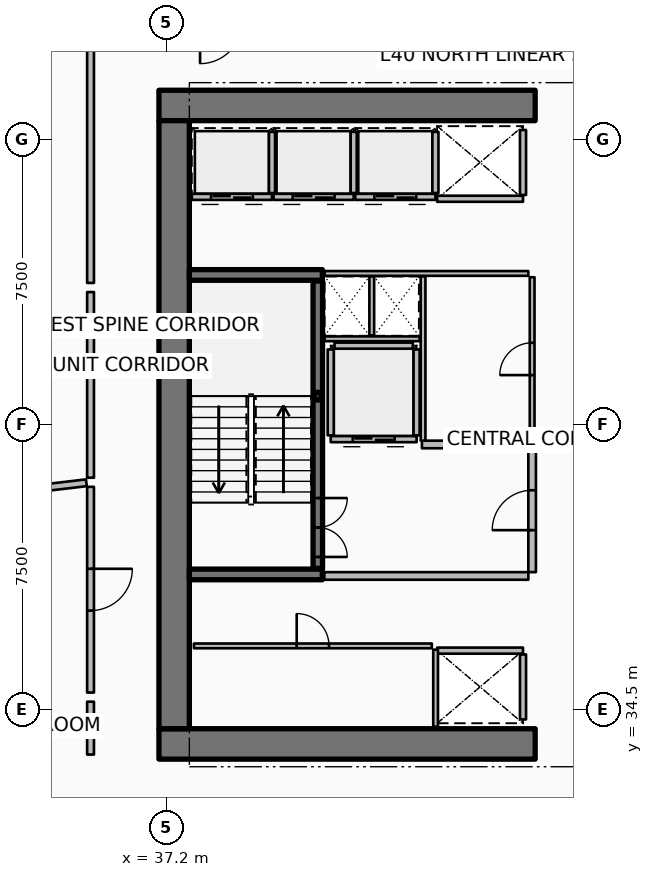
"""IFC4 building model, lengths in metres.
Left out: names, types, materials, properties, quantities, classifications, styles, units other than length and angle.
Written with IfcOpenShell. Run it as: python <this file> out.ifc"""

import sys

from ifc_helpers import new_model, si_unit, direction, frame, frame_2d, origin, origin_2d, place, context, subcontext, project, spatial, rectangle, hollow_rectangle, extrude, element, fill, save


model = new_model("IFC4")
c1 = context("Model", 3, precision=1e-05, world=origin(), true_north=direction((0.0, 1.0)))
c2 = subcontext(c1, "Body", "Model", "MODEL_VIEW")
j1 = project(units=[si_unit("LENGTHUNIT", "METRE"), si_unit("PLANEANGLEUNIT", "RADIAN")], contexts=[c1])
p1 = place(None, origin())
s1 = spatial("IfcSite", under=j1, at=p1, CompositionType="ELEMENT")
p2 = place(p1, origin())
s2 = spatial("IfcBuilding", under=s1, at=p2, CompositionType="ELEMENT")
p3 = place(p2, frame((0.0, 0.0, 161.55)))
s3 = spatial("IfcBuildingStorey", under=s2, at=p3, CompositionType="ELEMENT", Elevation=161.55)
for number, where, z_axis, x_axis in (
    (1, (37.0, 33.6, 0.0), (0.0, 0.0, 1.0), (1.0, 0.0, 0.0)),
    (2, (37.0, 50.4, 0.0), (0.0, 0.0, 1.0), (1.0, 0.0, 0.0)),
):
    element("IfcWall", number, at=place(p3, frame(where, z_axis=z_axis, x_axis=x_axis)), inside=s3, PredefinedType="SHEAR", context=c2, shape_type="SweptSolid", body=[
        extrude(rectangle(XDim=9.9, YDim=0.8, at=frame_2d((4.95, 0.0))), origin(), (0.0, 0.0, 1.0), 3.75),
    ])
p4 = place(p3, frame((37.4, 34.0, 0.0), z_axis=(0.0, 0.0, 1.0), x_axis=(0.0, 1.0, 0.0)))
e3 = element("IfcWall", 3, at=p4, inside=s3, PredefinedType="SHEAR", context=c2, shape_type="SweptSolid", body=[
    extrude(rectangle(XDim=16.0, YDim=0.8, at=frame_2d((8.0, 0.0))), origin(), (0.0, 0.0, 1.0), 3.75),
])
for number, where, z_axis, x_axis in (
    (4, (37.8, 38.06, 0.0), (0.0, 0.0, 1.0), (1.0, 0.0, 0.0)),
    (5, (37.8, 45.94, 0.0), (0.0, 0.0, 1.0), (1.0, 0.0, 0.0)),
):
    element("IfcWall", number, at=place(p3, frame(where, z_axis=z_axis, x_axis=x_axis)), inside=s3, PredefinedType="SHEAR", context=c2, shape_type="SweptSolid", body=[
        extrude(rectangle(XDim=3.5, YDim=0.28, at=frame_2d((1.75, 0.0))), origin(), (0.0, 0.0, 1.0), 3.75),
    ])
p5 = place(p3, frame((41.18, 42.75, 0.0), z_axis=(0.0, 0.0, 1.0), x_axis=(1.0, 0.0, 0.0)))
e6 = element("IfcColumn", 6, at=p5, inside=s3, PredefinedType="COLUMN", context=c2, shape_type="SweptSolid", body=[
    extrude(hollow_rectangle(XDim=0.2, YDim=0.2, WallThickness=0.01, InnerFilletRadius=0.01, OuterFilletRadius=0.02, at=origin_2d()), origin(), (0.0, 0.0, 1.0), 1.67),
])
p6 = place(p3, frame((41.18, 38.22, 0.0), z_axis=(0.0, 0.0, 1.0), x_axis=(0.0, 1.0, 0.0)))
e7 = element("IfcWall", 7, at=p6, inside=s3, PredefinedType="SOLIDWALL", context=c2, shape_type="SweptSolid", body=[
    extrude(rectangle(XDim=7.56, YDim=0.25, at=frame_2d((3.78, 0.0))), origin(), (0.0, 0.0, 1.0), 3.5),
])
p7 = place(p6, frame((0.3, 0.0, 0.0)))
e8 = element("IfcOpeningElement", 8, at=p7, cuts=e7, PredefinedType="OPENING", context=c2, shape_type="SweptSolid", body=[
    extrude(rectangle(XDim=1.55, YDim=2.15, at=frame_2d((0.775, 1.075))), frame((0.0, 0.135, 0.0), z_axis=(0.0, -1.0, 0.0), x_axis=(1.0, 0.0, 0.0)), (0.0, 0.0, 1.0), 0.27),
])
p8 = place(p3, frame((39.975, 47.995, 0.0), z_axis=(0.0, 0.0, 1.0), x_axis=(-1.0, 0.0, 0.0)))
e9 = element("IfcWall", 9, at=p8, inside=s3, PredefinedType="PARTITIONING", context=c2, shape_type="SweptSolid", body=[
    extrude(rectangle(XDim=2.11, YDim=0.16, at=frame_2d((1.055, 0.0))), origin(), (0.0, 0.0, 1.0), 3.5),
])
p9 = place(p8, frame((0.505, 0.0, 0.0)))
e10 = element("IfcOpeningElement", 10, at=p9, cuts=e9, PredefinedType="OPENING", context=c2, shape_type="SweptSolid", body=[
    extrude(rectangle(XDim=1.1, YDim=2.1, at=frame_2d((0.55, 1.05))), frame((0.0, 0.09, 0.0), z_axis=(0.0, -1.0, 0.0), x_axis=(1.0, 0.0, 0.0)), (0.0, 0.0, 1.0), 0.18),
])
p10 = place(p3, frame((39.975, 48.095, 0.0), z_axis=(0.0, 0.0, 1.0), x_axis=(0.0, 1.0, 0.0)))
e11 = element("IfcWall", 11, at=p10, inside=s3, PredefinedType="PARTITIONING", context=c2, shape_type="SweptSolid", body=[
    extrude(rectangle(XDim=1.61, YDim=0.16, at=frame_2d((0.805, 0.0))), origin(), (0.0, 0.0, 1.0), 3.5),
])
p11 = place(p3, frame((42.125, 47.995, 0.0), z_axis=(0.0, 0.0, 1.0), x_axis=(-1.0, 0.0, 0.0)))
e12 = element("IfcWall", 12, at=p11, inside=s3, PredefinedType="PARTITIONING", context=c2, shape_type="SweptSolid", body=[
    extrude(rectangle(XDim=2.11, YDim=0.16, at=frame_2d((1.055, 0.0))), origin(), (0.0, 0.0, 1.0), 3.5),
])
p12 = place(p11, frame((0.505, 0.0, 0.0)))
e13 = element("IfcOpeningElement", 13, at=p12, cuts=e12, PredefinedType="OPENING", context=c2, shape_type="SweptSolid", body=[
    extrude(rectangle(XDim=1.1, YDim=2.1, at=frame_2d((0.55, 1.05))), frame((0.0, 0.09, 0.0), z_axis=(0.0, -1.0, 0.0), x_axis=(1.0, 0.0, 0.0)), (0.0, 0.0, 1.0), 0.18),
])
p13 = place(p3, frame((42.125, 48.095, 0.0), z_axis=(0.0, 0.0, 1.0), x_axis=(0.0, 1.0, 0.0)))
e14 = element("IfcWall", 14, at=p13, inside=s3, PredefinedType="PARTITIONING", context=c2, shape_type="SweptSolid", body=[
    extrude(rectangle(XDim=1.61, YDim=0.16, at=frame_2d((0.805, 0.0))), origin(), (0.0, 0.0, 1.0), 3.5),
])
p14 = place(p3, frame((44.275, 47.995, 0.0), z_axis=(0.0, 0.0, 1.0), x_axis=(-1.0, 0.0, 0.0)))
e15 = element("IfcWall", 15, at=p14, inside=s3, PredefinedType="PARTITIONING", context=c2, shape_type="SweptSolid", body=[
    extrude(rectangle(XDim=2.11, YDim=0.16, at=frame_2d((1.055, 0.0))), origin(), (0.0, 0.0, 1.0), 3.5),
])
p15 = place(p14, frame((0.505, 0.0, 0.0)))
e16 = element("IfcOpeningElement", 16, at=p15, cuts=e15, PredefinedType="OPENING", context=c2, shape_type="SweptSolid", body=[
    extrude(rectangle(XDim=1.1, YDim=2.1, at=frame_2d((0.55, 1.05))), frame((0.0, 0.09, 0.0), z_axis=(0.0, -1.0, 0.0), x_axis=(1.0, 0.0, 0.0)), (0.0, 0.0, 1.0), 0.18),
])
p16 = place(p3, frame((44.275, 48.095, 0.0), z_axis=(0.0, 0.0, 1.0), x_axis=(0.0, 1.0, 0.0)))
e17 = element("IfcWall", 17, at=p16, inside=s3, PredefinedType="PARTITIONING", context=c2, shape_type="SweptSolid", body=[
    extrude(rectangle(XDim=1.61, YDim=0.16, at=frame_2d((0.805, 0.0))), origin(), (0.0, 0.0, 1.0), 3.5),
])
p17 = place(p3, frame((46.58, 47.945, 0.0), z_axis=(0.0, 0.0, 1.0), x_axis=(-1.0, 0.0, 0.0)))
e18 = element("IfcWall", 18, at=p17, inside=s3, PredefinedType="PARTITIONING", context=c2, shape_type="SweptSolid", body=[
    extrude(rectangle(XDim=2.26, YDim=0.16, at=frame_2d((1.13, 0.0))), origin(), (0.0, 0.0, 1.0), 3.5),
])
p18 = place(p3, frame((46.58, 48.045, 0.0), z_axis=(0.0, 0.0, 1.0), x_axis=(0.0, 1.0, 0.0)))
e19 = element("IfcWall", 19, at=p18, inside=s3, PredefinedType="PARTITIONING", context=c2, shape_type="SweptSolid", body=[
    extrude(rectangle(XDim=1.71, YDim=0.16, at=frame_2d((0.855, 0.0))), origin(), (0.0, 0.0, 1.0), 3.5),
])
p19 = place(p3, frame((44.32, 36.055, 0.0), z_axis=(0.0, 0.0, 1.0), x_axis=(1.0, 0.0, 0.0)))
e20 = element("IfcWall", 20, at=p19, inside=s3, PredefinedType="PARTITIONING", context=c2, shape_type="SweptSolid", body=[
    extrude(rectangle(XDim=2.26, YDim=0.16, at=frame_2d((1.13, 0.0))), origin(), (0.0, 0.0, 1.0), 3.5),
])
p20 = place(p3, frame((46.58, 34.245, 0.0), z_axis=(0.0, 0.0, 1.0), x_axis=(0.0, 1.0, 0.0)))
e21 = element("IfcWall", 21, at=p20, inside=s3, PredefinedType="PARTITIONING", context=c2, shape_type="SweptSolid", body=[
    extrude(rectangle(XDim=1.71, YDim=0.16, at=frame_2d((0.855, 0.0))), origin(), (0.0, 0.0, 1.0), 3.5),
])
p21 = place(p3, frame((43.78, 41.62, 0.0), z_axis=(0.0, 0.0, 1.0), x_axis=(-1.0, 0.0, 0.0)))
e22 = element("IfcWall", 22, at=p21, inside=s3, PredefinedType="PARTITIONING", context=c2, shape_type="SweptSolid", body=[
    extrude(rectangle(XDim=2.26, YDim=0.16, at=frame_2d((1.13, 0.0))), origin(), (0.0, 0.0, 1.0), 3.5),
])
p22 = place(p21, frame((0.58, 0.0, 0.0)))
e23 = element("IfcOpeningElement", 23, at=p22, cuts=e22, PredefinedType="OPENING", context=c2, shape_type="SweptSolid", body=[
    extrude(rectangle(XDim=1.1, YDim=2.1, at=frame_2d((0.55, 1.05))), frame((0.0, 0.09, 0.0), z_axis=(0.0, -1.0, 0.0), x_axis=(1.0, 0.0, 0.0)), (0.0, 0.0, 1.0), 0.18),
])
for number, where, z_axis, x_axis in (
    (24, (43.78, 41.72, 0.0), (0.0, 0.0, 1.0), (0.0, 1.0, 0.0)),
    (25, (41.52, 41.72, 0.0), (0.0, 0.0, 1.0), (0.0, 1.0, 0.0)),
):
    element("IfcWall", number, at=place(p3, frame(where, z_axis=z_axis, x_axis=x_axis)), inside=s3, PredefinedType="PARTITIONING", context=c2, shape_type="SweptSolid", body=[
        extrude(rectangle(XDim=2.26, YDim=0.16, at=frame_2d((1.13, 0.0))), origin(), (0.0, 0.0, 1.0), 3.5),
    ])
p23 = place(p3, frame((41.62, 44.08, 0.0), z_axis=(0.0, 0.0, 1.0), x_axis=(1.0, 0.0, 0.0)))
e26 = element("IfcWall", 26, at=p23, inside=s3, PredefinedType="PARTITIONING", context=c2, shape_type="SweptSolid", body=[
    extrude(rectangle(XDim=2.06, YDim=0.16, at=frame_2d((1.03, 0.0))), origin(), (0.0, 0.0, 1.0), 3.5),
])
p24 = place(p3, frame((44.28, 34.05, 0.0), z_axis=(0.0, 0.0, 1.0), x_axis=(0.0, 1.0, 0.0)))
e27 = element("IfcWall", 27, at=p24, inside=s3, PredefinedType="PARTITIONING", context=c2, shape_type="SweptSolid", body=[
    extrude(rectangle(XDim=2.03, YDim=0.125, at=frame_2d((1.015, 0.0))), origin(), (0.0, 0.0, 1.0), 2.94),
])
p25 = place(p3, frame((37.92, 36.18, 0.0), z_axis=(0.0, 0.0, 1.0), x_axis=(1.0, 0.0, 0.0)))
e28 = element("IfcWall", 28, at=p25, inside=s3, PredefinedType="PARTITIONING", context=c2, shape_type="SweptSolid", body=[
    extrude(rectangle(XDim=6.26, YDim=0.125, at=frame_2d((3.13, 0.0))), origin(), (0.0, 0.0, 1.0), 2.94),
])
p26 = place(p25, frame((2.705, 0.0, 0.0)))
e29 = element("IfcOpeningElement", 29, at=p26, cuts=e28, PredefinedType="OPENING", context=c2, shape_type="SweptSolid", body=[
    extrude(rectangle(XDim=0.85, YDim=2.06, at=frame_2d((0.425, 1.03))), frame((0.0, 0.073, 0.0), z_axis=(0.0, -1.0, 0.0), x_axis=(1.0, 0.0, 0.0)), (0.0, 0.0, 1.0), 0.145),
])
p27 = place(p3, frame((41.35, 38.02, 0.0), z_axis=(0.0, 0.0, 1.0), x_axis=(1.0, 0.0, 0.0)))
e30 = element("IfcWall", 30, at=p27, inside=s3, PredefinedType="PARTITIONING", context=c2, shape_type="SweptSolid", body=[
    extrude(rectangle(XDim=5.37, YDim=0.2, at=frame_2d((2.685, 0.0))), origin(), (0.0, 0.0, 1.0), 3.5),
])
p28 = place(p3, frame((43.92, 41.48, 0.0), z_axis=(0.0, 0.0, 1.0), x_axis=(1.0, 0.0, 0.0)))
e31 = element("IfcWall", 31, at=p28, inside=s3, PredefinedType="PARTITIONING", context=c2, shape_type="SweptSolid", body=[
    extrude(rectangle(XDim=2.8, YDim=0.2, at=frame_2d((1.4, 0.0))), origin(), (0.0, 0.0, 1.0), 3.5),
])
p29 = place(p3, frame((46.82, 38.12, 0.0), z_axis=(0.0, 0.0, 1.0), x_axis=(0.0, 1.0, 0.0)))
e32 = element("IfcWall", 32, at=p29, inside=s3, PredefinedType="PARTITIONING", context=c2, shape_type="SweptSolid", body=[
    extrude(rectangle(XDim=3.26, YDim=0.2, at=frame_2d((1.63, 0.0))), origin(), (0.0, 0.0, 1.0), 3.5),
])
p30 = place(p29, frame((1.105, 0.0, 0.0)))
e33 = element("IfcOpeningElement", 33, at=p30, cuts=e32, PredefinedType="OPENING", context=c2, shape_type="SweptSolid", body=[
    extrude(rectangle(XDim=1.05, YDim=2.1, at=frame_2d((0.525, 1.05))), frame((0.0, 0.11, 0.0), z_axis=(0.0, -1.0, 0.0), x_axis=(1.0, 0.0, 0.0)), (0.0, 0.0, 1.0), 0.22),
])
p31 = place(p3, frame((41.36, 45.98, 0.0), z_axis=(0.0, 0.0, 1.0), x_axis=(1.0, 0.0, 0.0)))
e34 = element("IfcWall", 34, at=p31, inside=s3, PredefinedType="PARTITIONING", context=c2, shape_type="SweptSolid", body=[
    extrude(rectangle(XDim=5.36, YDim=0.125, at=frame_2d((2.68, 0.0))), origin(), (0.0, 0.0, 1.0), 2.94),
])
p32 = place(p3, frame((41.36, 44.26, 0.0), z_axis=(0.0, 0.0, 1.0), x_axis=(1.0, 0.0, 0.0)))
e35 = element("IfcWall", 35, at=p32, inside=s3, PredefinedType="PARTITIONING", context=c2, shape_type="SweptSolid", body=[
    extrude(rectangle(XDim=2.5, YDim=0.125, at=frame_2d((1.25, 0.0))), origin(), (0.0, 0.0, 1.0), 2.94),
])
p33 = place(p3, frame((42.6, 44.35, 0.0), z_axis=(0.0, 0.0, 1.0), x_axis=(0.0, 1.0, 0.0)))
e36 = element("IfcWall", 36, at=p33, inside=s3, PredefinedType="PARTITIONING", context=c2, shape_type="SweptSolid", body=[
    extrude(rectangle(XDim=1.55, YDim=0.125, at=frame_2d((0.775, 0.0))), origin(), (0.0, 0.0, 1.0), 2.94),
])
p34 = place(p3, frame((43.95, 41.58, 0.0), z_axis=(0.0, 0.0, 1.0), x_axis=(0.0, 1.0, 0.0)))
e37 = element("IfcWall", 37, at=p34, inside=s3, PredefinedType="PARTITIONING", context=c2, shape_type="SweptSolid", body=[
    extrude(rectangle(XDim=4.32, YDim=0.125, at=frame_2d((2.16, 0.0))), origin(), (0.0, 0.0, 1.0), 2.94),
])
p35 = place(p3, frame((46.82, 41.58, 0.0), z_axis=(0.0, 0.0, 1.0), x_axis=(0.0, 1.0, 0.0)))
e38 = element("IfcWall", 38, at=p35, inside=s3, PredefinedType="PARTITIONING", context=c2, shape_type="SweptSolid", body=[
    extrude(rectangle(XDim=4.3, YDim=0.125, at=frame_2d((2.15, 0.0))), origin(), (0.0, 0.0, 1.0), 2.94),
])
p36 = place(p35, frame((1.725, 0.0, 0.0)))
e39 = element("IfcOpeningElement", 39, at=p36, cuts=e38, PredefinedType="OPENING", context=c2, shape_type="SweptSolid", body=[
    extrude(rectangle(XDim=0.85, YDim=2.06, at=frame_2d((0.425, 1.03))), frame((0.0, 0.073, 0.0), z_axis=(0.0, -1.0, 0.0), x_axis=(1.0, 0.0, 0.0)), (0.0, 0.0, 1.0), 0.145),
])
p37 = place(p3, frame((35.091, 40.472, 0.0), z_axis=(0.0, 0.0, 1.0), x_axis=(-0.993067434621, -0.11754603479, 0.0)))
e40 = element("IfcWall", 40, at=p37, inside=s3, PredefinedType="PARTITIONING", context=c2, shape_type="SweptSolid", body=[
    extrude(rectangle(XDim=13.787, YDim=0.18, at=frame_2d((6.894, 0.0))), origin(), (0.0, 0.0, 1.0), 2.94),
])
p38 = place(p3, frame((35.2, 51.971, 0.0), z_axis=(0.0, 0.0, 1.0), x_axis=(0.0, -1.0, 0.0)))
e41 = element("IfcWall", 41, at=p38, inside=s3, PredefinedType="PARTITIONING", context=c2, shape_type="SweptSolid", body=[
    extrude(rectangle(XDim=6.241, YDim=0.18, at=frame_2d((3.12, 0.0))), origin(), (0.0, 0.0, 1.0), 2.94),
])
p39 = place(p3, frame((35.2, 45.49, 0.0), z_axis=(0.0, 0.0, 1.0), x_axis=(0.0, -1.0, 0.0)))
e42 = element("IfcWall", 42, at=p39, inside=s3, PredefinedType="PARTITIONING", context=c2, shape_type="SweptSolid", body=[
    extrude(rectangle(XDim=4.885, YDim=0.18, at=frame_2d((2.442, 0.0))), origin(), (0.0, 0.0, 1.0), 2.94),
])
p40 = place(p3, frame((35.2, 40.365, 0.0), z_axis=(0.0, 0.0, 1.0), x_axis=(0.0, -1.0, 0.0)))
e43 = element("IfcWall", 43, at=p40, inside=s3, PredefinedType="PARTITIONING", context=c2, shape_type="SweptSolid", body=[
    extrude(rectangle(XDim=5.413, YDim=0.18, at=frame_2d((2.707, 0.0))), origin(), (0.0, 0.0, 1.0), 2.94),
])
p41 = place(p40, frame((2.156, 0.0, 0.0)))
e44 = element("IfcOpeningElement", 44, at=p41, cuts=e43, PredefinedType="OPENING", context=c2, shape_type="SweptSolid", body=[
    extrude(rectangle(XDim=1.1, YDim=2.1, at=frame_2d((0.55, 1.05))), frame((0.0, 0.1, 0.0), z_axis=(0.0, -1.0, 0.0), x_axis=(1.0, 0.0, 0.0)), (0.0, 0.0, 1.0), 0.2),
])
p42 = place(p3, frame((35.2, 34.712, 0.0), z_axis=(0.0, 0.0, 1.0), x_axis=(0.0, -1.0, 0.0)))
e45 = element("IfcWall", 45, at=p42, inside=s3, PredefinedType="PARTITIONING", context=c2, shape_type="SweptSolid", body=[
    extrude(rectangle(XDim=1.392, YDim=0.18, at=frame_2d((0.696, 0.0))), origin(), (0.0, 0.0, 1.0), 2.94),
])
p43 = place(p7, origin())
e46 = element("IfcDoor", 46, at=p43, inside=s3, OperationType="DOUBLE_DOOR_SINGLE_SWING", PredefinedType="DOOR", context=c2, shape_type="SweptSolid", body=[
    extrude(rectangle(XDim=1.55, YDim=2.15, at=frame_2d((0.775, 1.075))), frame((0.0, 0.025, 0.0), z_axis=(0.0, -1.0, 0.0), x_axis=(1.0, 0.0, 0.0)), (0.0, 0.0, 1.0), 0.05),
])
fill(e8, e46)
p44 = place(p9, origin())
e47 = element("IfcDoor", 47, at=p44, inside=s3, OperationType="DOUBLE_DOOR_SLIDING", PredefinedType="DOOR", context=c2, shape_type="SweptSolid", body=[
    extrude(rectangle(XDim=1.1, YDim=2.1, at=frame_2d((0.55, 1.05))), frame((0.0, 0.025, 0.0), z_axis=(0.0, -1.0, 0.0), x_axis=(1.0, 0.0, 0.0)), (0.0, 0.0, 1.0), 0.05),
])
fill(e10, e47)
p45 = place(p12, origin())
e48 = element("IfcDoor", 48, at=p45, inside=s3, OperationType="DOUBLE_DOOR_SLIDING", PredefinedType="DOOR", context=c2, shape_type="SweptSolid", body=[
    extrude(rectangle(XDim=1.1, YDim=2.1, at=frame_2d((0.55, 1.05))), frame((0.0, 0.025, 0.0), z_axis=(0.0, -1.0, 0.0), x_axis=(1.0, 0.0, 0.0)), (0.0, 0.0, 1.0), 0.05),
])
fill(e13, e48)
p46 = place(p15, origin())
e49 = element("IfcDoor", 49, at=p46, inside=s3, OperationType="DOUBLE_DOOR_SLIDING", PredefinedType="DOOR", context=c2, shape_type="SweptSolid", body=[
    extrude(rectangle(XDim=1.1, YDim=2.1, at=frame_2d((0.55, 1.05))), frame((0.0, 0.025, 0.0), z_axis=(0.0, -1.0, 0.0), x_axis=(1.0, 0.0, 0.0)), (0.0, 0.0, 1.0), 0.05),
])
fill(e16, e49)
p47 = place(p22, origin())
e50 = element("IfcDoor", 50, at=p47, inside=s3, OperationType="DOUBLE_DOOR_SLIDING", PredefinedType="DOOR", context=c2, shape_type="SweptSolid", body=[
    extrude(rectangle(XDim=1.1, YDim=2.1, at=frame_2d((0.55, 1.05))), frame((0.0, 0.025, 0.0), z_axis=(0.0, -1.0, 0.0), x_axis=(1.0, 0.0, 0.0)), (0.0, 0.0, 1.0), 0.05),
])
fill(e23, e50)
p48 = place(p26, origin())
e51 = element("IfcDoor", 51, at=p48, inside=s3, OperationType="SINGLE_SWING_LEFT", PredefinedType="DOOR", context=c2, shape_type="SweptSolid", body=[
    extrude(rectangle(XDim=0.85, YDim=2.06, at=frame_2d((0.425, 1.03))), frame((0.0, 0.025, 0.0), z_axis=(0.0, -1.0, 0.0), x_axis=(1.0, 0.0, 0.0)), (0.0, 0.0, 1.0), 0.05),
])
fill(e29, e51)
p49 = place(p30, origin())
e52 = element("IfcDoor", 52, at=p49, inside=s3, OperationType="SINGLE_SWING_LEFT", PredefinedType="DOOR", context=c2, shape_type="SweptSolid", body=[
    extrude(rectangle(XDim=1.05, YDim=2.1, at=frame_2d((0.525, 1.05))), frame((0.0, 0.025, 0.0), z_axis=(0.0, -1.0, 0.0), x_axis=(1.0, 0.0, 0.0)), (0.0, 0.0, 1.0), 0.05),
])
fill(e33, e52)
p50 = place(p36, origin())
e53 = element("IfcDoor", 53, at=p50, inside=s3, OperationType="SINGLE_SWING_LEFT", PredefinedType="DOOR", context=c2, shape_type="SweptSolid", body=[
    extrude(rectangle(XDim=0.85, YDim=2.06, at=frame_2d((0.425, 1.03))), frame((0.0, 0.025, 0.0), z_axis=(0.0, -1.0, 0.0), x_axis=(1.0, 0.0, 0.0)), (0.0, 0.0, 1.0), 0.05),
])
fill(e39, e53)
p51 = place(p41, origin())
e54 = element("IfcDoor", 54, at=p51, inside=s3, OperationType="SINGLE_SWING_LEFT", PredefinedType="DOOR", context=c2, shape_type="SweptSolid", body=[
    extrude(rectangle(XDim=1.1, YDim=2.1, at=frame_2d((0.55, 1.05))), frame((0.0, 0.025, 0.0), z_axis=(0.0, -1.0, 0.0), x_axis=(1.0, 0.0, 0.0)), (0.0, 0.0, 1.0), 0.05),
])
fill(e44, e54)
save(model, sys.argv[1])
